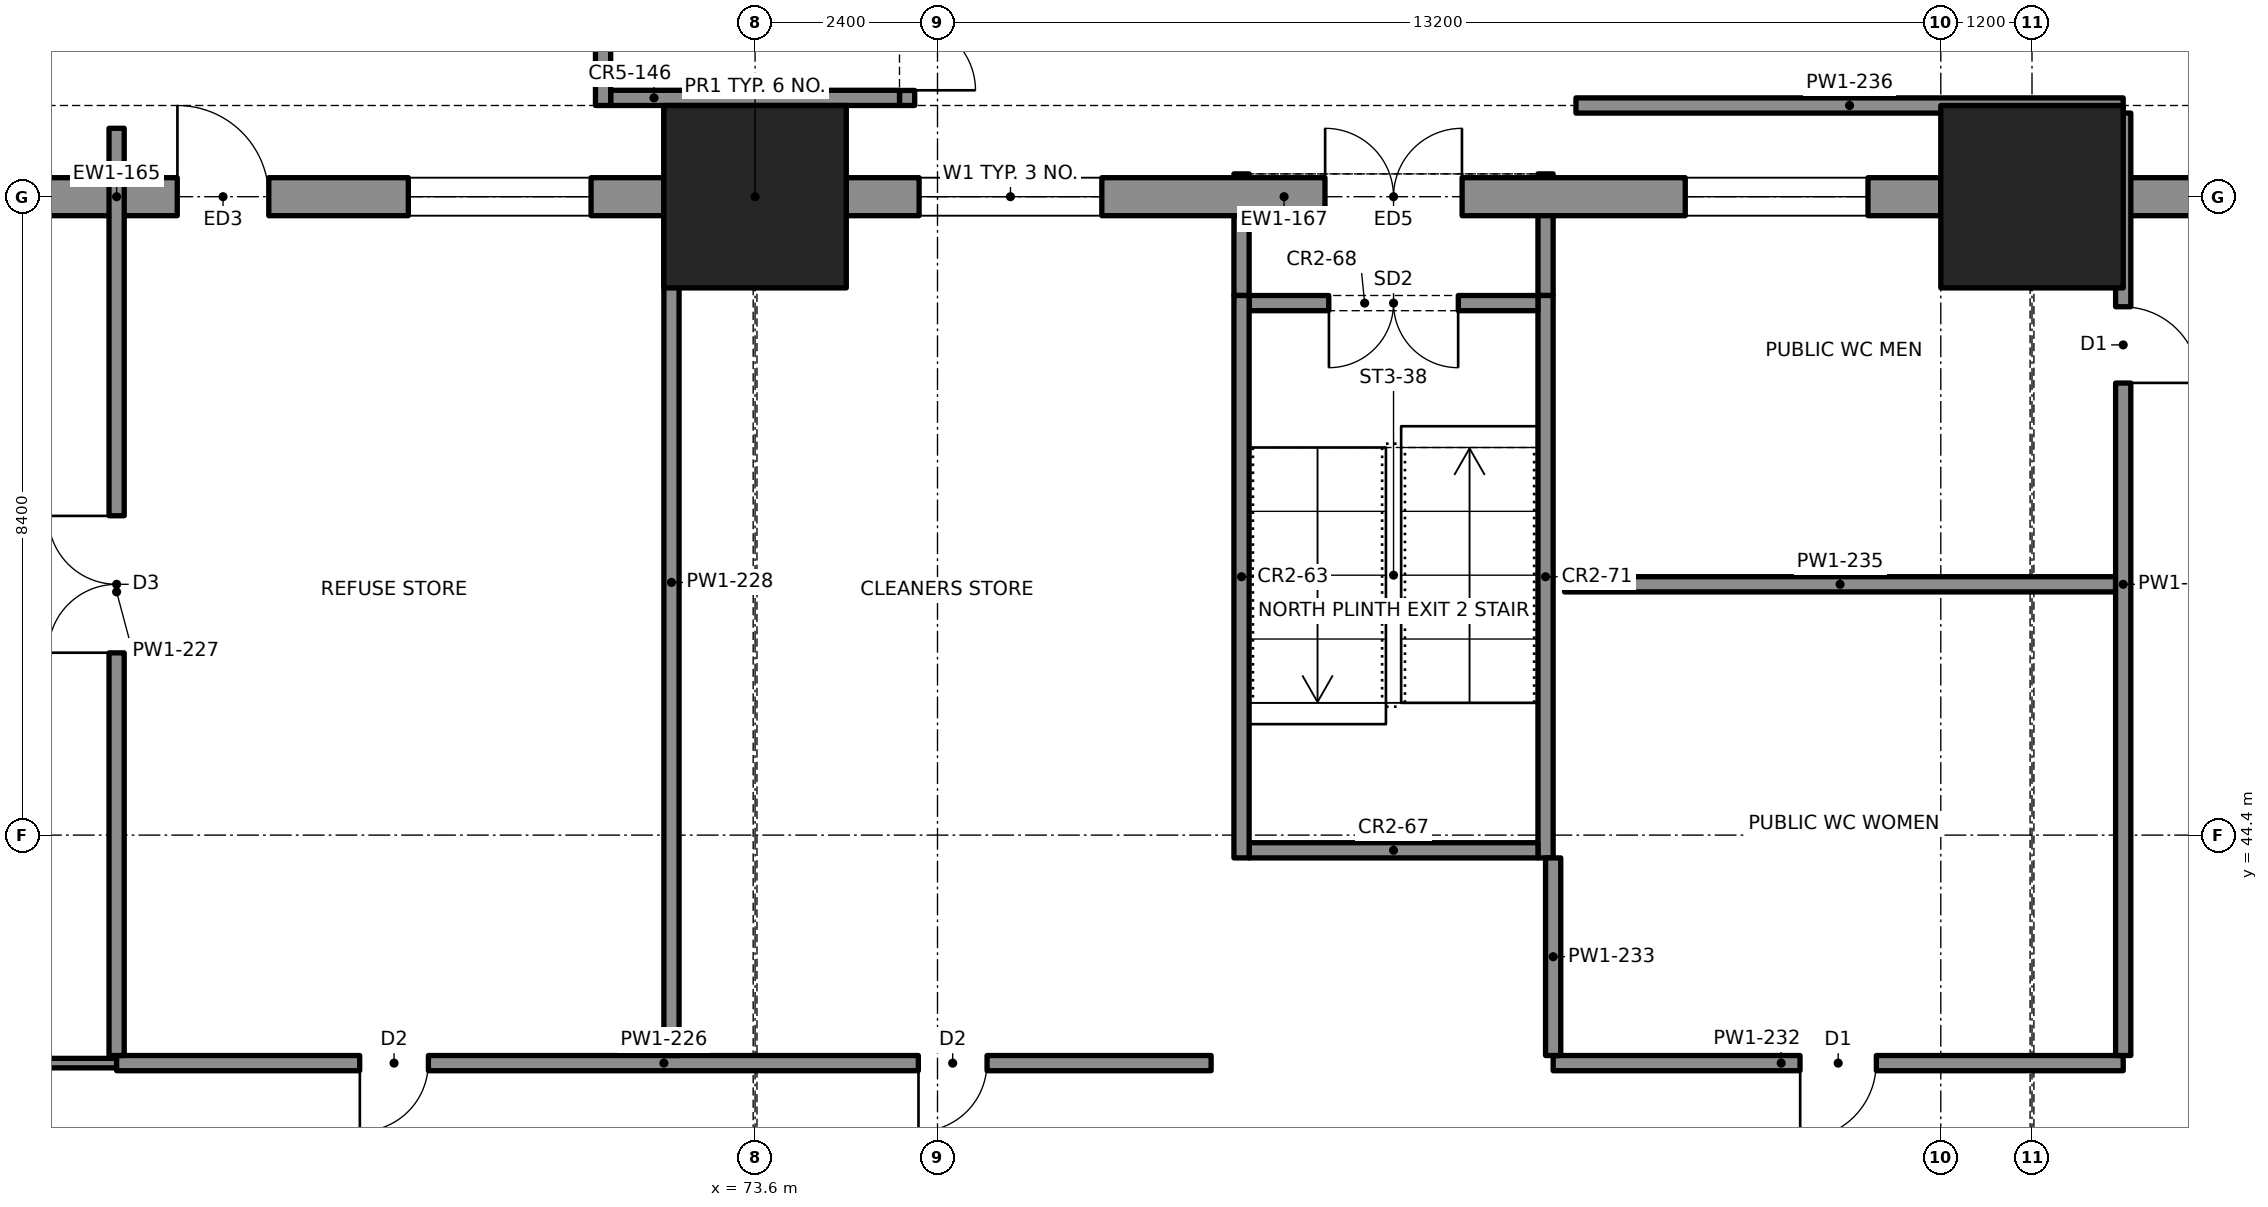
"""IFC4 building model, lengths in metres.
Left out: names, types, materials, properties, quantities, classifications, styles, units other than length and angle.
Written with IfcOpenShell. Run it as: python <this file> out.ifc"""

import sys

from ifc_helpers import new_model, si_unit, direction, frame, frame_2d, origin, origin_2d, place, context, subcontext, project, spatial, rectangle, extrude, element, fill, save


model = new_model("IFC4")
c1 = context("Model", 3, precision=1e-05, world=origin(), true_north=direction((0.0, 1.0)))
c2 = subcontext(c1, "Body", "Model", "MODEL_VIEW")
j1 = project(units=[si_unit("LENGTHUNIT", "METRE"), si_unit("PLANEANGLEUNIT", "RADIAN")], contexts=[c1])
p1 = place(None, origin())
s1 = spatial("IfcSite", under=j1, at=p1, CompositionType="ELEMENT")
p2 = place(p1, origin())
s2 = spatial("IfcBuilding", under=s1, at=p2, CompositionType="ELEMENT")
p3 = place(p2, origin())
s3 = spatial("IfcBuildingStorey", under=s2, at=p3, CompositionType="ELEMENT", Elevation=0.0)
for number, where, z_axis, x_axis in (
    (1, (73.6, 52.8, -0.9), (0.0, 0.0, 1.0), (1.0, 0.0, 0.0)),
    (2, (90.4, 52.8, -0.9), (0.0, 0.0, 1.0), (1.0, 0.0, 0.0)),
):
    element("IfcColumn", number, at=place(p3, frame(where, z_axis=z_axis, x_axis=x_axis)), inside=s3, PredefinedType="COLUMN", context=c2, shape_type="SweptSolid", body=[
        extrude(rectangle(XDim=2.4, YDim=2.4, at=origin_2d()), origin(), (0.0, 0.0, 1.0), 5.3),
    ])
p4 = place(p3, frame((58.0, 52.8, 0.0), z_axis=(0.0, 0.0, 1.0), x_axis=(1.0, 0.0, 0.0)))
e3 = element("IfcWall", 3, at=p4, inside=s3, PredefinedType="SOLIDWALL", context=c2, shape_type="SweptSolid", body=[
    extrude(rectangle(XDim=14.4, YDim=0.5, at=frame_2d((7.2, 0.0))), origin(), (0.0, 0.0, 1.0), 3.65),
])
p5 = place(p4, frame((0.96, 0.0, 0.9)))
e4 = element("IfcOpeningElement", 4, at=p5, cuts=e3, PredefinedType="OPENING", context=c2, shape_type="SweptSolid", body=[
    extrude(rectangle(XDim=2.4, YDim=1.8, at=frame_2d((1.2, 0.9))), frame((0.0, 0.26, 0.0), z_axis=(0.0, -1.0, 0.0), x_axis=(1.0, 0.0, 0.0)), (0.0, 0.0, 1.0), 0.52),
])
p6 = place(p4, frame((11.04, 0.0, 0.9)))
e5 = element("IfcOpeningElement", 5, at=p6, cuts=e3, PredefinedType="OPENING", context=c2, shape_type="SweptSolid", body=[
    extrude(rectangle(XDim=2.4, YDim=1.8, at=frame_2d((1.2, 0.9))), frame((0.0, 0.26, 0.0), z_axis=(0.0, -1.0, 0.0), x_axis=(1.0, 0.0, 0.0)), (0.0, 0.0, 1.0), 0.52),
])
p7 = place(p4, frame((8.0, 0.0, 0.0)))
e6 = element("IfcOpeningElement", 6, at=p7, cuts=e3, PredefinedType="OPENING", context=c2, shape_type="SweptSolid", body=[
    extrude(rectangle(XDim=1.2, YDim=2.4, at=frame_2d((0.6, 1.2))), frame((0.0, 0.26, 0.0), z_axis=(0.0, -1.0, 0.0), x_axis=(1.0, 0.0, 0.0)), (0.0, 0.0, 1.0), 0.52),
])
p8 = place(p3, frame((74.8, 52.8, 0.0), z_axis=(0.0, 0.0, 1.0), x_axis=(1.0, 0.0, 0.0)))
e7 = element("IfcWall", 7, at=p8, inside=s3, PredefinedType="SOLIDWALL", context=c2, shape_type="SweptSolid", body=[
    extrude(rectangle(XDim=14.4, YDim=0.5, at=frame_2d((7.2, 0.0))), origin(), (0.0, 0.0, 1.0), 3.65),
])
p9 = place(p8, frame((0.96, 0.0, 0.9)))
e8 = element("IfcOpeningElement", 8, at=p9, cuts=e7, PredefinedType="OPENING", context=c2, shape_type="SweptSolid", body=[
    extrude(rectangle(XDim=2.4, YDim=1.8, at=frame_2d((1.2, 0.9))), frame((0.0, 0.26, 0.0), z_axis=(0.0, -1.0, 0.0), x_axis=(1.0, 0.0, 0.0)), (0.0, 0.0, 1.0), 0.52),
])
p10 = place(p8, frame((11.04, 0.0, 0.9)))
e9 = element("IfcOpeningElement", 9, at=p10, cuts=e7, PredefinedType="OPENING", context=c2, shape_type="SweptSolid", body=[
    extrude(rectangle(XDim=2.4, YDim=1.8, at=frame_2d((1.2, 0.9))), frame((0.0, 0.26, 0.0), z_axis=(0.0, -1.0, 0.0), x_axis=(1.0, 0.0, 0.0)), (0.0, 0.0, 1.0), 0.52),
])
p11 = place(p8, frame((6.3, 0.0, 0.0)))
e10 = element("IfcOpeningElement", 10, at=p11, cuts=e7, PredefinedType="OPENING", context=c2, shape_type="SweptSolid", body=[
    extrude(rectangle(XDim=1.8, YDim=2.4, at=frame_2d((0.9, 1.2))), frame((0.0, 0.26, 0.0), z_axis=(0.0, -1.0, 0.0), x_axis=(1.0, 0.0, 0.0)), (0.0, 0.0, 1.0), 0.52),
])
p12 = place(p3, frame((91.6, 52.8, 0.0), z_axis=(0.0, 0.0, 1.0), x_axis=(1.0, 0.0, 0.0)))
e11 = element("IfcWall", 11, at=p12, inside=s3, PredefinedType="SOLIDWALL", context=c2, shape_type="SweptSolid", body=[
    extrude(rectangle(XDim=14.4, YDim=0.5, at=frame_2d((7.2, 0.0))), origin(), (0.0, 0.0, 1.0), 3.65),
])
p13 = place(p12, frame((1.2, 0.0, 0.45)))
e12 = element("IfcOpeningElement", 12, at=p13, cuts=e11, PredefinedType="OPENING", context=c2, shape_type="SweptSolid", body=[
    extrude(rectangle(XDim=2.4, YDim=2.7, at=frame_2d((1.2, 1.35))), frame((0.0, 0.26, 0.0), z_axis=(0.0, -1.0, 0.0), x_axis=(1.0, 0.0, 0.0)), (0.0, 0.0, 1.0), 0.52),
])
p14 = place(p12, frame((10.8, 0.0, 0.45)))
e13 = element("IfcOpeningElement", 13, at=p14, cuts=e11, PredefinedType="OPENING", context=c2, shape_type="SweptSolid", body=[
    extrude(rectangle(XDim=2.4, YDim=2.7, at=frame_2d((1.2, 1.35))), frame((0.0, 0.26, 0.0), z_axis=(0.0, -1.0, 0.0), x_axis=(1.0, 0.0, 0.0)), (0.0, 0.0, 1.0), 0.52),
])
p15 = place(p12, frame((5.4, 0.0, 0.0)))
e14 = element("IfcOpeningElement", 14, at=p15, cuts=e11, PredefinedType="OPENING", context=c2, shape_type="SweptSolid", body=[
    extrude(rectangle(XDim=3.6, YDim=2.7, at=frame_2d((1.8, 1.35))), frame((0.0, 0.26, 0.0), z_axis=(0.0, -1.0, 0.0), x_axis=(1.0, 0.0, 0.0)), (0.0, 0.0, 1.0), 0.52),
])
p16 = place(p3, frame((71.6, 54.0, 0.0), z_axis=(0.0, 0.0, 1.0), x_axis=(0.0, 1.0, 0.0)))
e15 = element("IfcWall", 15, at=p16, inside=s3, PredefinedType="SOLIDWALL", context=c2, shape_type="SweptSolid", body=[
    extrude(rectangle(XDim=7.4, YDim=0.2, at=frame_2d((3.7, 0.0))), origin(), (0.0, 0.0, 1.0), 4.4),
])
p17 = place(p3, frame((75.6, 61.4, 0.0), z_axis=(0.0, 0.0, 1.0), x_axis=(0.0, -1.0, 0.0)))
e16 = element("IfcWall", 16, at=p17, inside=s3, PredefinedType="SOLIDWALL", context=c2, shape_type="SweptSolid", body=[
    extrude(rectangle(XDim=7.4, YDim=0.2, at=frame_2d((3.7, 0.0))), origin(), (0.0, 0.0, 1.0), 4.4),
])
p18 = place(p17, frame((5.4, 0.0, 0.0)))
e17 = element("IfcOpeningElement", 17, at=p18, cuts=e16, PredefinedType="OPENING", context=c2, shape_type="SweptSolid", body=[
    extrude(rectangle(XDim=1.8, YDim=2.1, at=frame_2d((0.9, 1.05))), frame((0.0, 0.11, 0.0), z_axis=(0.0, -1.0, 0.0), x_axis=(1.0, 0.0, 0.0)), (0.0, 0.0, 1.0), 0.22),
])
p19 = place(p3, frame((71.7, 54.1, 0.0), z_axis=(0.0, 0.0, 1.0), x_axis=(1.0, 0.0, 0.0)))
e18 = element("IfcWall", 18, at=p19, inside=s3, PredefinedType="SOLIDWALL", context=c2, shape_type="SweptSolid", body=[
    extrude(rectangle(XDim=3.8, YDim=0.2, at=frame_2d((1.9, 0.0))), origin(), (0.0, 0.0, 1.0), 4.4),
])
for number, where, z_axis, x_axis in (
    (19, (80.0, 44.1, 0.0), (0.0, 0.0, 1.0), (0.0, 1.0, 0.0)),
    (20, (84.0, 44.1, 0.0), (0.0, 0.0, 1.0), (0.0, 1.0, 0.0)),
):
    element("IfcWall", number, at=place(p3, frame(where, z_axis=z_axis, x_axis=x_axis)), inside=s3, PredefinedType="SOLIDWALL", context=c2, shape_type="SweptSolid", body=[
        extrude(rectangle(XDim=7.4, YDim=0.2, at=frame_2d((3.7, 0.0))), origin(), (0.0, 0.0, 1.0), 4.4),
    ])
p20 = place(p3, frame((80.1, 44.2, 0.0), z_axis=(0.0, 0.0, 1.0), x_axis=(1.0, 0.0, 0.0)))
e21 = element("IfcWall", 21, at=p20, inside=s3, PredefinedType="SOLIDWALL", context=c2, shape_type="SweptSolid", body=[
    extrude(rectangle(XDim=3.8, YDim=0.2, at=frame_2d((1.9, 0.0))), origin(), (0.0, 0.0, 1.0), 4.4),
])
p21 = place(p3, frame((80.1, 51.4, 0.0), z_axis=(0.0, 0.0, 1.0), x_axis=(1.0, 0.0, 0.0)))
e22 = element("IfcWall", 22, at=p21, inside=s3, PredefinedType="SOLIDWALL", context=c2, shape_type="SweptSolid", body=[
    extrude(rectangle(XDim=3.8, YDim=0.2, at=frame_2d((1.9, 0.0))), origin(), (0.0, 0.0, 1.0), 4.4),
])
p22 = place(p21, frame((1.05, 0.0, 0.0)))
e23 = element("IfcOpeningElement", 23, at=p22, cuts=e22, PredefinedType="OPENING", context=c2, shape_type="SweptSolid", body=[
    extrude(rectangle(XDim=1.7, YDim=2.1, at=frame_2d((0.85, 1.05))), frame((0.0, 0.11, 0.0), z_axis=(0.0, -1.0, 0.0), x_axis=(1.0, 0.0, 0.0)), (0.0, 0.0, 1.0), 0.22),
])
for number, where, z_axis, x_axis in (
    (24, (80.0, 51.5, 0.0), (0.0, 0.0, 1.0), (0.0, 1.0, 0.0)),
    (25, (84.0, 51.5, 0.0), (0.0, 0.0, 1.0), (0.0, 1.0, 0.0)),
):
    element("IfcWall", number, at=place(p3, frame(where, z_axis=z_axis, x_axis=x_axis)), inside=s3, PredefinedType="SOLIDWALL", context=c2, shape_type="SweptSolid", body=[
        extrude(rectangle(XDim=1.6, YDim=0.2, at=frame_2d((0.8, 0.0))), origin(), (0.0, 0.0, 1.0), 4.4),
    ])
p23 = place(p3, frame((50.8, 41.4, 0.0), z_axis=(0.0, 0.0, 1.0), x_axis=(1.0, 0.0, 0.0)))
e26 = element("IfcWall", 26, at=p23, inside=s3, PredefinedType="PARTITIONING", context=c2, shape_type="SweptSolid", body=[
    extrude(rectangle(XDim=14.4, YDim=0.125, at=frame_2d((7.2, 0.0))), origin(), (0.0, 0.0, 1.0), 3.65),
])
p24 = place(p23, frame((6.15, 0.0, 0.0)))
e27 = element("IfcOpeningElement", 27, at=p24, cuts=e26, PredefinedType="OPENING", context=c2, shape_type="SweptSolid", body=[
    extrude(rectangle(XDim=1.8, YDim=2.1, at=frame_2d((0.9, 1.05))), frame((0.0, 0.073, 0.0), z_axis=(0.0, -1.0, 0.0), x_axis=(1.0, 0.0, 0.0)), (0.0, 0.0, 1.0), 0.145),
])
p25 = place(p3, frame((65.2, 41.4, 0.0), z_axis=(0.0, 0.0, 1.0), x_axis=(1.0, 0.0, 0.0)))
e28 = element("IfcWall", 28, at=p25, inside=s3, PredefinedType="PARTITIONING", context=c2, shape_type="SweptSolid", body=[
    extrude(rectangle(XDim=14.4, YDim=0.2, at=frame_2d((7.2, 0.0))), origin(), (0.0, 0.0, 1.0), 3.65),
])
p26 = place(p25, frame((3.2, 0.0, 0.0)))
e29 = element("IfcOpeningElement", 29, at=p26, cuts=e28, PredefinedType="OPENING", context=c2, shape_type="SweptSolid", body=[
    extrude(rectangle(XDim=0.9, YDim=2.1, at=frame_2d((0.45, 1.05))), frame((0.0, 0.11, 0.0), z_axis=(0.0, -1.0, 0.0), x_axis=(1.0, 0.0, 0.0)), (0.0, 0.0, 1.0), 0.22),
])
p27 = place(p25, frame((10.55, 0.0, 0.0)))
e30 = element("IfcOpeningElement", 30, at=p27, cuts=e28, PredefinedType="OPENING", context=c2, shape_type="SweptSolid", body=[
    extrude(rectangle(XDim=0.9, YDim=2.1, at=frame_2d((0.45, 1.05))), frame((0.0, 0.11, 0.0), z_axis=(0.0, -1.0, 0.0), x_axis=(1.0, 0.0, 0.0)), (0.0, 0.0, 1.0), 0.22),
])
p28 = place(p3, frame((84.1, 41.4, 0.0), z_axis=(0.0, 0.0, 1.0), x_axis=(1.0, 0.0, 0.0)))
e31 = element("IfcWall", 31, at=p28, inside=s3, PredefinedType="PARTITIONING", context=c2, shape_type="SweptSolid", body=[
    extrude(rectangle(XDim=7.5, YDim=0.2, at=frame_2d((3.75, 0.0))), origin(), (0.0, 0.0, 1.0), 3.65),
])
p29 = place(p28, frame((3.25, 0.0, 0.0)))
e32 = element("IfcOpeningElement", 32, at=p29, cuts=e31, PredefinedType="OPENING", context=c2, shape_type="SweptSolid", body=[
    extrude(rectangle(XDim=1.0, YDim=2.1, at=frame_2d((0.5, 1.05))), frame((0.0, 0.11, 0.0), z_axis=(0.0, -1.0, 0.0), x_axis=(1.0, 0.0, 0.0)), (0.0, 0.0, 1.0), 0.22),
])
p30 = place(p3, frame((84.25, 47.7, 0.0), z_axis=(0.0, 0.0, 1.0), x_axis=(1.0, 0.0, 0.0)))
e33 = element("IfcWall", 33, at=p30, inside=s3, PredefinedType="PARTITIONING", context=c2, shape_type="SweptSolid", body=[
    extrude(rectangle(XDim=7.25, YDim=0.2, at=frame_2d((3.625, 0.0))), origin(), (0.0, 0.0, 1.0), 3.65),
])
p31 = place(p3, frame((84.4, 54.0, 0.0), z_axis=(0.0, 0.0, 1.0), x_axis=(1.0, 0.0, 0.0)))
e34 = element("IfcWall", 34, at=p31, inside=s3, PredefinedType="PARTITIONING", context=c2, shape_type="SweptSolid", body=[
    extrude(rectangle(XDim=7.2, YDim=0.2, at=frame_2d((3.6, 0.0))), origin(), (0.0, 0.0, 1.0), 3.65),
])
p32 = place(p3, frame((65.2, 41.5, 0.0), z_axis=(0.0, 0.0, 1.0), x_axis=(0.0, 1.0, 0.0)))
e35 = element("IfcWall", 35, at=p32, inside=s3, PredefinedType="PARTITIONING", context=c2, shape_type="SweptSolid", body=[
    extrude(rectangle(XDim=12.2, YDim=0.2, at=frame_2d((6.1, 0.0))), origin(), (0.0, 0.0, 1.0), 3.65),
])
p33 = place(p32, frame((5.3, 0.0, 0.0)))
e36 = element("IfcOpeningElement", 36, at=p33, cuts=e35, PredefinedType="OPENING", context=c2, shape_type="SweptSolid", body=[
    extrude(rectangle(XDim=1.8, YDim=2.1, at=frame_2d((0.9, 1.05))), frame((0.0, 0.11, 0.0), z_axis=(0.0, -1.0, 0.0), x_axis=(1.0, 0.0, 0.0)), (0.0, 0.0, 1.0), 0.22),
])
p34 = place(p3, frame((72.5, 41.5, 0.0), z_axis=(0.0, 0.0, 1.0), x_axis=(0.0, 1.0, 0.0)))
e37 = element("IfcWall", 37, at=p34, inside=s3, PredefinedType="PARTITIONING", context=c2, shape_type="SweptSolid", body=[
    extrude(rectangle(XDim=12.45, YDim=0.2, at=frame_2d((6.225, 0.0))), origin(), (0.0, 0.0, 1.0), 3.65),
])
p35 = place(p3, frame((84.1, 41.5, 0.0), z_axis=(0.0, 0.0, 1.0), x_axis=(0.0, 1.0, 0.0)))
e38 = element("IfcWall", 38, at=p35, inside=s3, PredefinedType="PARTITIONING", context=c2, shape_type="SweptSolid", body=[
    extrude(rectangle(XDim=2.6, YDim=0.2, at=frame_2d((1.3, 0.0))), origin(), (0.0, 0.0, 1.0), 3.65),
])
p36 = place(p3, frame((91.6, 41.5, 0.0), z_axis=(0.0, 0.0, 1.0), x_axis=(0.0, 1.0, 0.0)))
e39 = element("IfcWall", 39, at=p36, inside=s3, PredefinedType="PARTITIONING", context=c2, shape_type="SweptSolid", body=[
    extrude(rectangle(XDim=12.4, YDim=0.2, at=frame_2d((6.2, 0.0))), origin(), (0.0, 0.0, 1.0), 3.65),
])
p37 = place(p36, frame((8.85, 0.0, 0.0)))
e40 = element("IfcOpeningElement", 40, at=p37, cuts=e39, PredefinedType="OPENING", context=c2, shape_type="SweptSolid", body=[
    extrude(rectangle(XDim=1.0, YDim=2.1, at=frame_2d((0.5, 1.05))), frame((0.0, 0.11, 0.0), z_axis=(0.0, -1.0, 0.0), x_axis=(1.0, 0.0, 0.0)), (0.0, 0.0, 1.0), 0.22),
])
p38 = place(p6, origin())
e41 = element("IfcWindow", 41, at=p38, inside=s3, PartitioningType="SINGLE_PANEL", PredefinedType="WINDOW", context=c2, shape_type="SweptSolid", body=[
    extrude(rectangle(XDim=2.4, YDim=1.8, at=frame_2d((1.2, 0.9))), frame((0.0, 0.03, 0.0), z_axis=(0.0, -1.0, 0.0), x_axis=(1.0, 0.0, 0.0)), (0.0, 0.0, 1.0), 0.06),
])
fill(e5, e41)
p39 = place(p7, origin())
e42 = element("IfcDoor", 42, at=p39, inside=s3, OperationType="SINGLE_SWING_LEFT", PredefinedType="DOOR", context=c2, shape_type="SweptSolid", body=[
    extrude(rectangle(XDim=1.2, YDim=2.4, at=frame_2d((0.6, 1.2))), frame((0.0, 0.025, 0.0), z_axis=(0.0, -1.0, 0.0), x_axis=(1.0, 0.0, 0.0)), (0.0, 0.0, 1.0), 0.05),
])
fill(e6, e42)
p40 = place(p9, origin())
e43 = element("IfcWindow", 43, at=p40, inside=s3, PartitioningType="SINGLE_PANEL", PredefinedType="WINDOW", context=c2, shape_type="SweptSolid", body=[
    extrude(rectangle(XDim=2.4, YDim=1.8, at=frame_2d((1.2, 0.9))), frame((0.0, 0.03, 0.0), z_axis=(0.0, -1.0, 0.0), x_axis=(1.0, 0.0, 0.0)), (0.0, 0.0, 1.0), 0.06),
])
fill(e8, e43)
p41 = place(p10, origin())
e44 = element("IfcWindow", 44, at=p41, inside=s3, PartitioningType="SINGLE_PANEL", PredefinedType="WINDOW", context=c2, shape_type="SweptSolid", body=[
    extrude(rectangle(XDim=2.4, YDim=1.8, at=frame_2d((1.2, 0.9))), frame((0.0, 0.03, 0.0), z_axis=(0.0, -1.0, 0.0), x_axis=(1.0, 0.0, 0.0)), (0.0, 0.0, 1.0), 0.06),
])
fill(e9, e44)
p42 = place(p11, origin())
e45 = element("IfcDoor", 45, at=p42, inside=s3, OperationType="DOUBLE_DOOR_SINGLE_SWING", PredefinedType="DOOR", context=c2, shape_type="SweptSolid", body=[
    extrude(rectangle(XDim=1.8, YDim=2.4, at=frame_2d((0.9, 1.2))), frame((0.0, 0.025, 0.0), z_axis=(0.0, -1.0, 0.0), x_axis=(1.0, 0.0, 0.0)), (0.0, 0.0, 1.0), 0.05),
])
fill(e10, e45)
p43 = place(p18, origin())
e46 = element("IfcDoor", 46, at=p43, inside=s3, OperationType="DOUBLE_DOOR_SINGLE_SWING", PredefinedType="DOOR", context=c2, shape_type="SweptSolid", body=[
    extrude(rectangle(XDim=1.8, YDim=2.1, at=frame_2d((0.9, 1.05))), frame((0.0, 0.025, 0.0), z_axis=(0.0, -1.0, 0.0), x_axis=(1.0, 0.0, 0.0)), (0.0, 0.0, 1.0), 0.05),
])
fill(e17, e46)
p44 = place(p22, origin())
e47 = element("IfcDoor", 47, at=p44, inside=s3, OperationType="DOUBLE_DOOR_SINGLE_SWING", PredefinedType="DOOR", context=c2, shape_type="SweptSolid", body=[
    extrude(rectangle(XDim=1.7, YDim=2.1, at=frame_2d((0.85, 1.05))), frame((0.0, 0.025, 0.0), z_axis=(0.0, -1.0, 0.0), x_axis=(1.0, 0.0, 0.0)), (0.0, 0.0, 1.0), 0.05),
])
fill(e23, e47)
p45 = place(p26, origin())
e48 = element("IfcDoor", 48, at=p45, inside=s3, OperationType="SINGLE_SWING_LEFT", PredefinedType="DOOR", context=c2, shape_type="SweptSolid", body=[
    extrude(rectangle(XDim=0.9, YDim=2.1, at=frame_2d((0.45, 1.05))), frame((0.0, 0.025, 0.0), z_axis=(0.0, -1.0, 0.0), x_axis=(1.0, 0.0, 0.0)), (0.0, 0.0, 1.0), 0.05),
])
fill(e29, e48)
p46 = place(p27, origin())
e49 = element("IfcDoor", 49, at=p46, inside=s3, OperationType="SINGLE_SWING_LEFT", PredefinedType="DOOR", context=c2, shape_type="SweptSolid", body=[
    extrude(rectangle(XDim=0.9, YDim=2.1, at=frame_2d((0.45, 1.05))), frame((0.0, 0.025, 0.0), z_axis=(0.0, -1.0, 0.0), x_axis=(1.0, 0.0, 0.0)), (0.0, 0.0, 1.0), 0.05),
])
fill(e30, e49)
p47 = place(p29, origin())
e50 = element("IfcDoor", 50, at=p47, inside=s3, OperationType="SINGLE_SWING_LEFT", PredefinedType="DOOR", context=c2, shape_type="SweptSolid", body=[
    extrude(rectangle(XDim=1.0, YDim=2.1, at=frame_2d((0.5, 1.05))), frame((0.0, 0.025, 0.0), z_axis=(0.0, -1.0, 0.0), x_axis=(1.0, 0.0, 0.0)), (0.0, 0.0, 1.0), 0.05),
])
fill(e32, e50)
p48 = place(p37, origin())
e51 = element("IfcDoor", 51, at=p48, inside=s3, OperationType="SINGLE_SWING_LEFT", PredefinedType="DOOR", context=c2, shape_type="SweptSolid", body=[
    extrude(rectangle(XDim=1.0, YDim=2.1, at=frame_2d((0.5, 1.05))), frame((0.0, 0.025, 0.0), z_axis=(0.0, -1.0, 0.0), x_axis=(1.0, 0.0, 0.0)), (0.0, 0.0, 1.0), 0.05),
])
fill(e40, e51)
p49 = place(p33, origin())
e52 = element("IfcDoor", 52, at=p49, inside=s3, OperationType="DOUBLE_DOOR_SINGLE_SWING", PredefinedType="DOOR", context=c2, shape_type="SweptSolid", body=[
    extrude(rectangle(XDim=1.8, YDim=2.1, at=frame_2d((0.9, 1.05))), frame((0.0, 0.025, 0.0), z_axis=(0.0, -1.0, 0.0), x_axis=(1.0, 0.0, 0.0)), (0.0, 0.0, 1.0), 0.05),
])
fill(e36, e52)
save(model, sys.argv[1])
